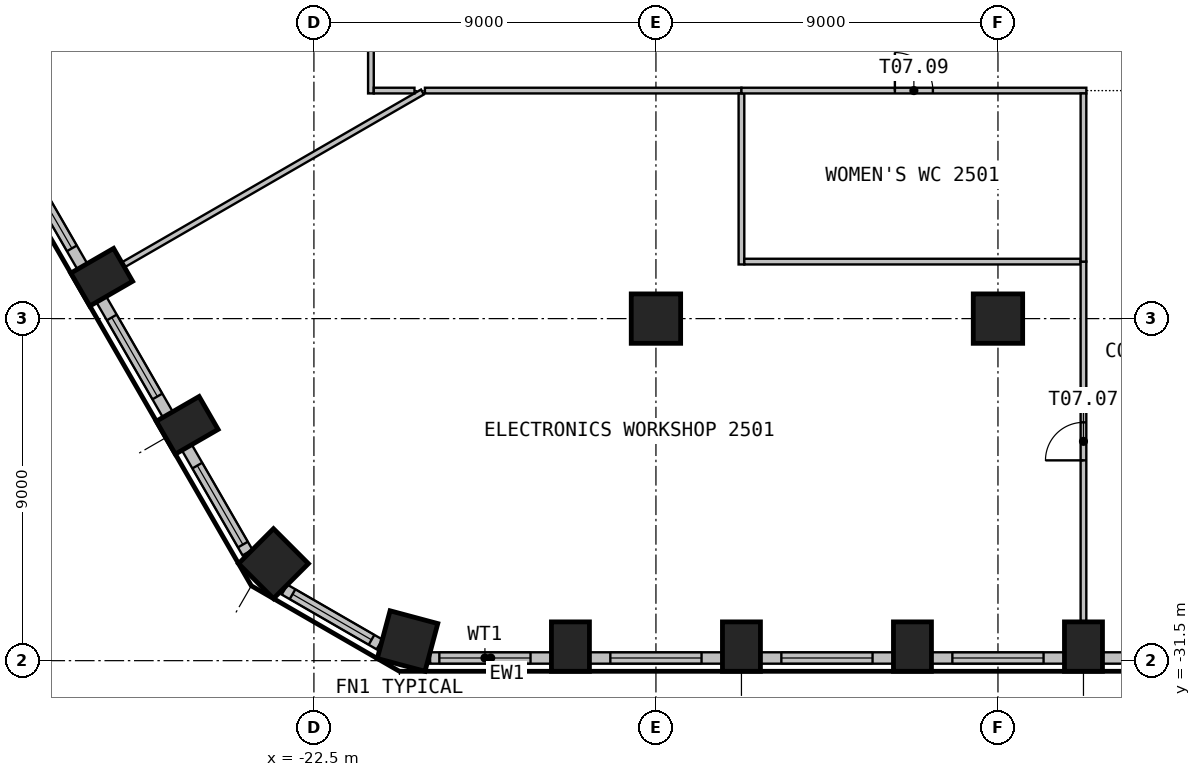
"""IFC4 building model, lengths in metres.
Left out: names, types, materials, properties, quantities, classifications, styles, units other than length and angle.
Written with IfcOpenShell. Run it as: python <this file> out.ifc"""

import sys

from ifc_helpers import new_model, si_unit, direction, frame, frame_2d, origin, origin_2d, place, context, subcontext, project, spatial, rectangle, circle, extrude, element, fill, save


model = new_model("IFC4")
c1 = context("Model", 3, precision=1e-05, world=origin(), true_north=direction((0.0, 1.0)))
c2 = subcontext(c1, "Body", "Model", "MODEL_VIEW")
j1 = project(units=[si_unit("LENGTHUNIT", "METRE"), si_unit("PLANEANGLEUNIT", "RADIAN")], contexts=[c1])
p1 = place(None, origin())
s1 = spatial("IfcSite", under=j1, at=p1, CompositionType="ELEMENT")
p2 = place(p1, origin())
s2 = spatial("IfcBuilding", under=s1, at=p2, CompositionType="ELEMENT")
p3 = place(p2, frame((0.0, 0.0, 104.7)))
s3 = spatial("IfcBuildingStorey", under=s2, at=p3, CompositionType="ELEMENT", Elevation=104.7)
p4 = place(p3, frame((-20.037, -30.984, 0.0), z_axis=(0.0, 0.0, 1.0), x_axis=(0.965925826289, -0.258819045103, 0.0)))
e1 = element("IfcColumn", 1, at=p4, inside=s3, PredefinedType="COLUMN", context=c2, shape_type="SweptSolid", body=[
    extrude(rectangle(XDim=1.3, YDim=1.3, at=origin_2d()), origin(), (0.0, 0.0, 1.0), 3.525),
])
for number, where, z_axis, x_axis in (
    (2, (-15.75, -31.13, 0.0), (0.0, 0.0, 1.0), (1.0, 0.0, 0.0)),
    (3, (-11.25, -31.13, 0.0), (0.0, 0.0, 1.0), (1.0, 0.0, 0.0)),
    (4, (-6.75, -31.13, 0.0), (0.0, 0.0, 1.0), (1.0, 0.0, 0.0)),
    (5, (-2.25, -31.13, 0.0), (0.0, 0.0, 1.0), (1.0, 0.0, 0.0)),
    (6, (-28.084, -21.411, 0.0), (0.0, 0.0, 1.0), (0.5, -0.866, 0.0)),
    (7, (-25.834, -25.308, 0.0), (0.0, 0.0, 1.0), (0.5, -0.866, 0.0)),
):
    element("IfcColumn", number, at=place(p3, frame(where, z_axis=z_axis, x_axis=x_axis)), inside=s3, PredefinedType="COLUMN", context=c2, shape_type="SweptSolid", body=[
        extrude(rectangle(XDim=1.0, YDim=1.3, at=origin_2d()), origin(), (0.0, 0.0, 1.0), 3.525),
    ])
p5 = place(p3, frame((-23.564, -28.947, 0.0), z_axis=(0.0, 0.0, 1.0), x_axis=(0.707106781187, -0.707106781187, 0.0)))
e8 = element("IfcColumn", 8, at=p5, inside=s3, PredefinedType="COLUMN", context=c2, shape_type="SweptSolid", body=[
    extrude(rectangle(XDim=1.3, YDim=1.3, at=origin_2d()), origin(), (0.0, 0.0, 1.0), 3.525),
])
for number, where, z_axis, x_axis in (
    (9, (-13.5, -22.5, 0.0), (0.0, 0.0, 1.0), (1.0, 0.0, 0.0)),
    (10, (-4.5, -22.5, 0.0), (0.0, 0.0, 1.0), (1.0, 0.0, 0.0)),
):
    element("IfcColumn", number, at=place(p3, frame(where, z_axis=z_axis, x_axis=x_axis)), inside=s3, PredefinedType="COLUMN", context=c2, shape_type="SweptSolid", body=[
        extrude(circle(Radius=0.65, at=origin_2d()), origin(), (0.0, 0.0, 1.0), 3.525),
    ])
p6 = place(p3, frame((-19.443, -31.43, 0.0), z_axis=(0.0, 0.0, 1.0), x_axis=(1.0, 0.0, 0.0)))
e11 = element("IfcWall", 11, at=p6, inside=s3, PredefinedType="SOLIDWALL", context=c2, shape_type="SweptSolid", body=[
    extrude(rectangle(XDim=3.192, YDim=0.3, at=frame_2d((1.596, 0.0))), origin(), (0.0, 0.0, 1.0), 3.525),
])
p7 = place(p6, frame((0.243, 0.0, 0.9)))
e12 = element("IfcOpeningElement", 12, at=p7, cuts=e11, PredefinedType="OPENING", context=c2, shape_type="SweptSolid", body=[
    extrude(rectangle(XDim=2.4, YDim=2.1, at=frame_2d((1.2, 1.05))), frame((0.0, 0.16, 0.0), z_axis=(0.0, -1.0, 0.0), x_axis=(1.0, 0.0, 0.0)), (0.0, 0.0, 1.0), 0.32),
])
p8 = place(p3, frame((-15.25, -31.43, 0.0), z_axis=(0.0, 0.0, 1.0), x_axis=(1.0, 0.0, 0.0)))
e13 = element("IfcWall", 13, at=p8, inside=s3, PredefinedType="SOLIDWALL", context=c2, shape_type="SweptSolid", body=[
    extrude(rectangle(XDim=3.499, YDim=0.3, at=frame_2d((1.75, 0.0))), origin(), (0.0, 0.0, 1.0), 3.525),
])
p9 = place(p8, frame((0.55, 0.0, 0.9)))
e14 = element("IfcOpeningElement", 14, at=p9, cuts=e13, PredefinedType="OPENING", context=c2, shape_type="SweptSolid", body=[
    extrude(rectangle(XDim=2.4, YDim=2.1, at=frame_2d((1.2, 1.05))), frame((0.0, 0.16, 0.0), z_axis=(0.0, -1.0, 0.0), x_axis=(1.0, 0.0, 0.0)), (0.0, 0.0, 1.0), 0.32),
])
p10 = place(p3, frame((-10.75, -31.43, 0.0), z_axis=(0.0, 0.0, 1.0), x_axis=(1.0, 0.0, 0.0)))
e15 = element("IfcWall", 15, at=p10, inside=s3, PredefinedType="SOLIDWALL", context=c2, shape_type="SweptSolid", body=[
    extrude(rectangle(XDim=3.499, YDim=0.3, at=frame_2d((1.75, 0.0))), origin(), (0.0, 0.0, 1.0), 3.525),
])
p11 = place(p10, frame((0.55, 0.0, 0.9)))
e16 = element("IfcOpeningElement", 16, at=p11, cuts=e15, PredefinedType="OPENING", context=c2, shape_type="SweptSolid", body=[
    extrude(rectangle(XDim=2.4, YDim=2.1, at=frame_2d((1.2, 1.05))), frame((0.0, 0.16, 0.0), z_axis=(0.0, -1.0, 0.0), x_axis=(1.0, 0.0, 0.0)), (0.0, 0.0, 1.0), 0.32),
])
p12 = place(p3, frame((-6.25, -31.43, 0.0), z_axis=(0.0, 0.0, 1.0), x_axis=(1.0, 0.0, 0.0)))
e17 = element("IfcWall", 17, at=p12, inside=s3, PredefinedType="SOLIDWALL", context=c2, shape_type="SweptSolid", body=[
    extrude(rectangle(XDim=3.499, YDim=0.3, at=frame_2d((1.75, 0.0))), origin(), (0.0, 0.0, 1.0), 3.525),
])
p13 = place(p12, frame((0.55, 0.0, 0.9)))
e18 = element("IfcOpeningElement", 18, at=p13, cuts=e17, PredefinedType="OPENING", context=c2, shape_type="SweptSolid", body=[
    extrude(rectangle(XDim=2.4, YDim=2.1, at=frame_2d((1.2, 1.05))), frame((0.0, 0.16, 0.0), z_axis=(0.0, -1.0, 0.0), x_axis=(1.0, 0.0, 0.0)), (0.0, 0.0, 1.0), 0.32),
])
p14 = place(p3, frame((-1.75, -31.43, 0.0), z_axis=(0.0, 0.0, 1.0), x_axis=(1.0, 0.0, 0.0)))
e19 = element("IfcWall", 19, at=p14, inside=s3, PredefinedType="SOLIDWALL", context=c2, shape_type="SweptSolid", body=[
    extrude(rectangle(XDim=3.499, YDim=0.3, at=frame_2d((1.75, 0.0))), origin(), (0.0, 0.0, 1.0), 3.525),
])
p15 = place(p14, frame((0.55, 0.0, 0.9)))
e20 = element("IfcOpeningElement", 20, at=p15, cuts=e19, PredefinedType="OPENING", context=c2, shape_type="SweptSolid", body=[
    extrude(rectangle(XDim=2.4, YDim=2.1, at=frame_2d((1.2, 1.05))), frame((0.0, 0.16, 0.0), z_axis=(0.0, -1.0, 0.0), x_axis=(1.0, 0.0, 0.0)), (0.0, 0.0, 1.0), 0.32),
])
p16 = place(p3, frame((-30.344, -18.097, 0.0), z_axis=(0.0, 0.0, 1.0), x_axis=(0.499996256241, -0.866027565234, 0.0)))
e21 = element("IfcWall", 21, at=p16, inside=s3, PredefinedType="SOLIDWALL", context=c2, shape_type="SweptSolid", body=[
    extrude(rectangle(XDim=3.499, YDim=0.3, at=frame_2d((1.75, 0.0))), origin(), (0.0, 0.0, 1.0), 3.525),
])
p17 = place(p16, frame((0.55, 0.0, 0.9)))
e22 = element("IfcOpeningElement", 22, at=p17, cuts=e21, PredefinedType="OPENING", context=c2, shape_type="SweptSolid", body=[
    extrude(rectangle(XDim=2.4, YDim=2.1, at=frame_2d((1.2, 1.05))), frame((0.0, 0.16, 0.0), z_axis=(0.0, -1.0, 0.0), x_axis=(1.0, 0.0, 0.0)), (0.0, 0.0, 1.0), 0.32),
])
p18 = place(p3, frame((-28.094, -21.994, 0.0), z_axis=(0.0, 0.0, 1.0), x_axis=(0.499996256241, -0.866027565234, 0.0)))
e23 = element("IfcWall", 23, at=p18, inside=s3, PredefinedType="SOLIDWALL", context=c2, shape_type="SweptSolid", body=[
    extrude(rectangle(XDim=3.499, YDim=0.3, at=frame_2d((1.75, 0.0))), origin(), (0.0, 0.0, 1.0), 3.525),
])
p19 = place(p18, frame((0.55, 0.0, 0.9)))
e24 = element("IfcOpeningElement", 24, at=p19, cuts=e23, PredefinedType="OPENING", context=c2, shape_type="SweptSolid", body=[
    extrude(rectangle(XDim=2.4, YDim=2.1, at=frame_2d((1.2, 1.05))), frame((0.0, 0.16, 0.0), z_axis=(0.0, -1.0, 0.0), x_axis=(1.0, 0.0, 0.0)), (0.0, 0.0, 1.0), 0.32),
])
p20 = place(p3, frame((-25.844, -25.891, 0.0), z_axis=(0.0, 0.0, 1.0), x_axis=(0.500004907028, -0.866022570692, 0.0)))
e25 = element("IfcWall", 25, at=p20, inside=s3, PredefinedType="SOLIDWALL", context=c2, shape_type="SweptSolid", body=[
    extrude(rectangle(XDim=3.192, YDim=0.3, at=frame_2d((1.596, 0.0))), origin(), (0.0, 0.0, 1.0), 3.525),
])
p21 = place(p20, frame((0.55, 0.0, 0.9)))
e26 = element("IfcOpeningElement", 26, at=p21, cuts=e25, PredefinedType="OPENING", context=c2, shape_type="SweptSolid", body=[
    extrude(rectangle(XDim=2.4, YDim=2.1, at=frame_2d((1.2, 1.05))), frame((0.0, 0.16, 0.0), z_axis=(0.0, -1.0, 0.0), x_axis=(1.0, 0.0, 0.0)), (0.0, 0.0, 1.0), 0.32),
])
p22 = place(p3, frame((-23.273, -29.63, 0.0), z_axis=(0.0, 0.0, 1.0), x_axis=(0.866053149362, -0.49995194017, 0.0)))
e27 = element("IfcWall", 27, at=p22, inside=s3, PredefinedType="SOLIDWALL", context=c2, shape_type="SweptSolid", body=[
    extrude(rectangle(XDim=2.885, YDim=0.3, at=frame_2d((1.443, 0.0))), origin(), (0.0, 0.0, 1.0), 3.525),
])
p23 = place(p22, frame((0.243, 0.0, 0.9)))
e28 = element("IfcOpeningElement", 28, at=p23, cuts=e27, PredefinedType="OPENING", context=c2, shape_type="SweptSolid", body=[
    extrude(rectangle(XDim=2.4, YDim=2.1, at=frame_2d((1.2, 1.05))), frame((0.0, 0.16, 0.0), z_axis=(0.0, -1.0, 0.0), x_axis=(1.0, 0.0, 0.0)), (0.0, 0.0, 1.0), 0.32),
])
p24 = place(p3, frame((-19.644, -16.538, 0.0), z_axis=(0.0, 0.0, 1.0), x_axis=(-0.866004606565, -0.500036020111, 0.0)))
e29 = element("IfcWall", 29, at=p24, inside=s3, PredefinedType="PARTITIONING", context=c2, shape_type="SweptSolid", body=[
    extrude(rectangle(XDim=9.076, YDim=0.15, at=frame_2d((4.538, 0.0))), origin(), (0.0, 0.0, 1.0), 3.525),
])
p25 = place(p3, frame((-21.0, -2.325, 0.0), z_axis=(0.0, 0.0, 1.0), x_axis=(0.0, -1.0, 0.0)))
e30 = element("IfcWall", 30, at=p25, inside=s3, PredefinedType="PARTITIONING", context=c2, shape_type="SweptSolid", body=[
    extrude(rectangle(XDim=14.25, YDim=0.15, at=frame_2d((7.125, 0.0))), origin(), (0.0, 0.0, 1.0), 3.525),
])
p26 = place(p25, frame((6.625, 0.0, 0.0)))
e31 = element("IfcOpeningElement", 31, at=p26, cuts=e30, PredefinedType="OPENING", context=c2, shape_type="SweptSolid", body=[
    extrude(rectangle(XDim=1.0, YDim=2.1, at=frame_2d((0.5, 1.05))), frame((0.0, 0.085, 0.0), z_axis=(0.0, -1.0, 0.0), x_axis=(1.0, 0.0, 0.0)), (0.0, 0.0, 1.0), 0.17),
])
p27 = place(p3, frame((-20.925, -16.5, 0.0), z_axis=(0.0, 0.0, 1.0), x_axis=(1.0, 0.0, 0.0)))
e32 = element("IfcWall", 32, at=p27, inside=s3, PredefinedType="PARTITIONING", context=c2, shape_type="SweptSolid", body=[
    extrude(rectangle(XDim=1.071, YDim=0.15, at=frame_2d((0.536, 0.0))), origin(), (0.0, 0.0, 1.0), 3.525),
])
p28 = place(p3, frame((-19.579, -16.5, 0.0), z_axis=(0.0, 0.0, 1.0), x_axis=(1.0, 0.0, 0.0)))
e33 = element("IfcWall", 33, at=p28, inside=s3, PredefinedType="PARTITIONING", context=c2, shape_type="SweptSolid", body=[
    extrude(rectangle(XDim=8.329, YDim=0.15, at=frame_2d((4.165, 0.0))), origin(), (0.0, 0.0, 1.0), 3.525),
])
p29 = place(p3, frame((-11.25, -16.575, 0.0), z_axis=(0.0, 0.0, 1.0), x_axis=(0.0, -1.0, 0.0)))
e34 = element("IfcWall", 34, at=p29, inside=s3, PredefinedType="PARTITIONING", context=c2, shape_type="SweptSolid", body=[
    extrude(rectangle(XDim=4.5, YDim=0.15, at=frame_2d((2.25, 0.0))), origin(), (0.0, 0.0, 1.0), 3.525),
])
p30 = place(p3, frame((-11.175, -21.0, 0.0), z_axis=(0.0, 0.0, 1.0), x_axis=(1.0, 0.0, 0.0)))
e35 = element("IfcWall", 35, at=p30, inside=s3, PredefinedType="PARTITIONING", context=c2, shape_type="SweptSolid", body=[
    extrude(rectangle(XDim=8.85, YDim=0.15, at=frame_2d((4.425, 0.0))), origin(), (0.0, 0.0, 1.0), 3.525),
])
p31 = place(p3, frame((-11.25, -16.5, 0.0), z_axis=(0.0, 0.0, 1.0), x_axis=(1.0, 0.0, 0.0)))
e36 = element("IfcWall", 36, at=p31, inside=s3, PredefinedType="PARTITIONING", context=c2, shape_type="SweptSolid", body=[
    extrude(rectangle(XDim=9.075, YDim=0.15, at=frame_2d((4.538, 0.0))), origin(), (0.0, 0.0, 1.0), 3.525),
])
p32 = place(p31, frame((4.038, 0.0, 0.0)))
e37 = element("IfcOpeningElement", 37, at=p32, cuts=e36, PredefinedType="OPENING", context=c2, shape_type="SweptSolid", body=[
    extrude(rectangle(XDim=1.0, YDim=2.1, at=frame_2d((0.5, 1.05))), frame((0.0, 0.085, 0.0), z_axis=(0.0, -1.0, 0.0), x_axis=(1.0, 0.0, 0.0)), (0.0, 0.0, 1.0), 0.17),
])
p33 = place(p3, frame((-2.25, -30.46, 0.0), z_axis=(0.0, 0.0, 1.0), x_axis=(0.0, 1.0, 0.0)))
e38 = element("IfcWall", 38, at=p33, inside=s3, PredefinedType="PARTITIONING", context=c2, shape_type="SweptSolid", body=[
    extrude(rectangle(XDim=9.46, YDim=0.15, at=frame_2d((4.73, 0.0))), origin(), (0.0, 0.0, 1.0), 3.525),
])
p34 = place(p33, frame((4.23, 0.0, 0.0)))
e39 = element("IfcOpeningElement", 39, at=p34, cuts=e38, PredefinedType="OPENING", context=c2, shape_type="SweptSolid", body=[
    extrude(rectangle(XDim=1.0, YDim=2.1, at=frame_2d((0.5, 1.05))), frame((0.0, 0.085, 0.0), z_axis=(0.0, -1.0, 0.0), x_axis=(1.0, 0.0, 0.0)), (0.0, 0.0, 1.0), 0.17),
])
p35 = place(p3, frame((-2.25, -21.0, 0.0), z_axis=(0.0, 0.0, 1.0), x_axis=(0.0, 1.0, 0.0)))
e40 = element("IfcWall", 40, at=p35, inside=s3, PredefinedType="PARTITIONING", context=c2, shape_type="SweptSolid", body=[
    extrude(rectangle(XDim=4.425, YDim=0.15, at=frame_2d((2.212, 0.0))), origin(), (0.0, 0.0, 1.0), 3.525),
])
p36 = place(p7, origin())
e41 = element("IfcWindow", 41, at=p36, inside=s3, PartitioningType="SINGLE_PANEL", PredefinedType="WINDOW", context=c2, shape_type="SweptSolid", body=[
    extrude(rectangle(XDim=2.4, YDim=2.1, at=frame_2d((1.2, 1.05))), frame((0.0, 0.03, 0.0), z_axis=(0.0, -1.0, 0.0), x_axis=(1.0, 0.0, 0.0)), (0.0, 0.0, 1.0), 0.06),
])
fill(e12, e41)
p37 = place(p9, origin())
e42 = element("IfcWindow", 42, at=p37, inside=s3, PartitioningType="SINGLE_PANEL", PredefinedType="WINDOW", context=c2, shape_type="SweptSolid", body=[
    extrude(rectangle(XDim=2.4, YDim=2.1, at=frame_2d((1.2, 1.05))), frame((0.0, 0.03, 0.0), z_axis=(0.0, -1.0, 0.0), x_axis=(1.0, 0.0, 0.0)), (0.0, 0.0, 1.0), 0.06),
])
fill(e14, e42)
p38 = place(p11, origin())
e43 = element("IfcWindow", 43, at=p38, inside=s3, PartitioningType="SINGLE_PANEL", PredefinedType="WINDOW", context=c2, shape_type="SweptSolid", body=[
    extrude(rectangle(XDim=2.4, YDim=2.1, at=frame_2d((1.2, 1.05))), frame((0.0, 0.03, 0.0), z_axis=(0.0, -1.0, 0.0), x_axis=(1.0, 0.0, 0.0)), (0.0, 0.0, 1.0), 0.06),
])
fill(e16, e43)
p39 = place(p13, origin())
e44 = element("IfcWindow", 44, at=p39, inside=s3, PartitioningType="SINGLE_PANEL", PredefinedType="WINDOW", context=c2, shape_type="SweptSolid", body=[
    extrude(rectangle(XDim=2.4, YDim=2.1, at=frame_2d((1.2, 1.05))), frame((0.0, 0.03, 0.0), z_axis=(0.0, -1.0, 0.0), x_axis=(1.0, 0.0, 0.0)), (0.0, 0.0, 1.0), 0.06),
])
fill(e18, e44)
p40 = place(p17, origin())
e45 = element("IfcWindow", 45, at=p40, inside=s3, PartitioningType="SINGLE_PANEL", PredefinedType="WINDOW", context=c2, shape_type="SweptSolid", body=[
    extrude(rectangle(XDim=2.4, YDim=2.1, at=frame_2d((1.2, 1.05))), frame((0.0, 0.03, 0.0), z_axis=(0.0, -1.0, 0.0), x_axis=(1.0, 0.0, 0.0)), (0.0, 0.0, 1.0), 0.06),
])
fill(e22, e45)
p41 = place(p19, origin())
e46 = element("IfcWindow", 46, at=p41, inside=s3, PartitioningType="SINGLE_PANEL", PredefinedType="WINDOW", context=c2, shape_type="SweptSolid", body=[
    extrude(rectangle(XDim=2.4, YDim=2.1, at=frame_2d((1.2, 1.05))), frame((0.0, 0.03, 0.0), z_axis=(0.0, -1.0, 0.0), x_axis=(1.0, 0.0, 0.0)), (0.0, 0.0, 1.0), 0.06),
])
fill(e24, e46)
p42 = place(p21, origin())
e47 = element("IfcWindow", 47, at=p42, inside=s3, PartitioningType="SINGLE_PANEL", PredefinedType="WINDOW", context=c2, shape_type="SweptSolid", body=[
    extrude(rectangle(XDim=2.4, YDim=2.1, at=frame_2d((1.2, 1.05))), frame((0.0, 0.03, 0.0), z_axis=(0.0, -1.0, 0.0), x_axis=(1.0, 0.0, 0.0)), (0.0, 0.0, 1.0), 0.06),
])
fill(e26, e47)
p43 = place(p23, origin())
e48 = element("IfcWindow", 48, at=p43, inside=s3, PartitioningType="SINGLE_PANEL", PredefinedType="WINDOW", context=c2, shape_type="SweptSolid", body=[
    extrude(rectangle(XDim=2.4, YDim=2.1, at=frame_2d((1.2, 1.05))), frame((0.0, 0.03, 0.0), z_axis=(0.0, -1.0, 0.0), x_axis=(1.0, 0.0, 0.0)), (0.0, 0.0, 1.0), 0.06),
])
fill(e28, e48)
p44 = place(p34, origin())
e49 = element("IfcDoor", 49, at=p44, inside=s3, OperationType="SINGLE_SWING_LEFT", PredefinedType="DOOR", context=c2, shape_type="SweptSolid", body=[
    extrude(rectangle(XDim=1.0, YDim=2.1, at=frame_2d((0.5, 1.05))), frame((0.0, 0.025, 0.0), z_axis=(0.0, -1.0, 0.0), x_axis=(1.0, 0.0, 0.0)), (0.0, 0.0, 1.0), 0.05),
])
fill(e39, e49)
p45 = place(p32, origin())
e50 = element("IfcDoor", 50, at=p45, inside=s3, OperationType="SINGLE_SWING_LEFT", PredefinedType="DOOR", context=c2, shape_type="SweptSolid", body=[
    extrude(rectangle(XDim=1.0, YDim=2.1, at=frame_2d((0.5, 1.05))), frame((0.0, 0.025, 0.0), z_axis=(0.0, -1.0, 0.0), x_axis=(1.0, 0.0, 0.0)), (0.0, 0.0, 1.0), 0.05),
])
fill(e37, e50)
save(model, sys.argv[1])
